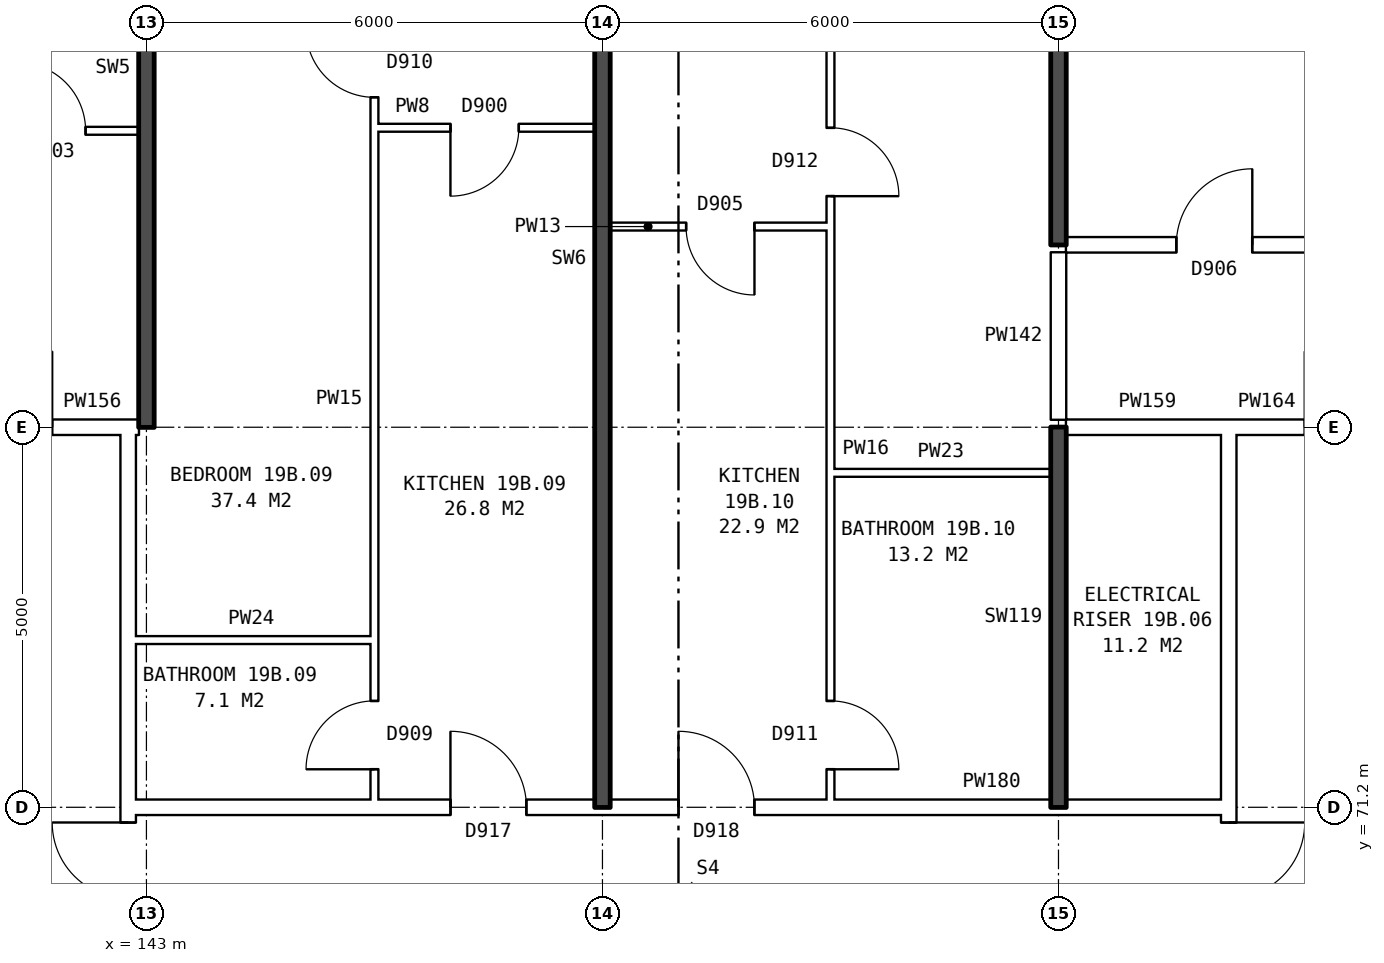
"""IFC4 building model, lengths in metres.
Left out: names, types, materials, properties, quantities, classifications, styles, units other than length and angle.
Written with IfcOpenShell. Run it as: python <this file> out.ifc"""

import sys

from ifc_helpers import new_model, si_unit, direction, frame, frame_2d, origin, place, context, subcontext, project, spatial, rectangle, extrude, element, fill, save


model = new_model("IFC4")
c1 = context("Model", 3, precision=1e-05, world=origin(), true_north=direction((0.0, 1.0)))
c2 = subcontext(c1, "Body", "Model", "MODEL_VIEW")
j1 = project(units=[si_unit("LENGTHUNIT", "METRE"), si_unit("PLANEANGLEUNIT", "RADIAN")], contexts=[c1])
p1 = place(None, origin())
s1 = spatial("IfcSite", under=j1, at=p1, CompositionType="ELEMENT")
p2 = place(p1, origin())
s2 = spatial("IfcBuilding", under=s1, at=p2, CompositionType="ELEMENT")
p3 = place(p2, frame((0.0, 0.0, 71.6)))
s3 = spatial("IfcBuildingStorey", under=s2, at=p3, CompositionType="ELEMENT", Elevation=71.6)
p4 = place(p3, frame((142.76, 63.9, 0.0), z_axis=(0.0, 0.0, 1.0), x_axis=(0.0, 1.0, 0.0)))
e1 = element("IfcWall", 1, at=p4, inside=s3, PredefinedType="PARTITIONING", context=c2, shape_type="SweptSolid", body=[
    extrude(rectangle(XDim=12.2, YDim=0.2, at=frame_2d((6.1, 0.0))), origin(), (0.0, 0.0, 1.0), 2.85),
])
p5 = place(p4, frame((5.1, 0.0, 0.0)))
e2 = element("IfcOpeningElement", 2, at=p5, cuts=e1, PredefinedType="OPENING", context=c2, shape_type="SweptSolid", body=[
    extrude(rectangle(XDim=2.0, YDim=2.1, at=frame_2d((1.0, 1.05))), frame((0.0, 0.11, 0.0), z_axis=(0.0, -1.0, 0.0), x_axis=(1.0, 0.0, 0.0)), (0.0, 0.0, 1.0), 0.22),
])
p6 = place(p3, frame((157.24, 63.9, 0.0), z_axis=(0.0, 0.0, 1.0), x_axis=(0.0, 1.0, 0.0)))
e3 = element("IfcWall", 3, at=p6, inside=s3, PredefinedType="PARTITIONING", context=c2, shape_type="SweptSolid", body=[
    extrude(rectangle(XDim=12.2, YDim=0.2, at=frame_2d((6.1, 0.0))), origin(), (0.0, 0.0, 1.0), 2.85),
])
p7 = place(p6, frame((5.1, 0.0, 0.0)))
e4 = element("IfcOpeningElement", 4, at=p7, cuts=e3, PredefinedType="OPENING", context=c2, shape_type="SweptSolid", body=[
    extrude(rectangle(XDim=2.0, YDim=2.1, at=frame_2d((1.0, 1.05))), frame((0.0, 0.11, 0.0), z_axis=(0.0, -1.0, 0.0), x_axis=(1.0, 0.0, 0.0)), (0.0, 0.0, 1.0), 0.22),
])
p8 = place(p3, frame((142.76, 71.2, 0.0), z_axis=(0.0, 0.0, 1.0), x_axis=(1.0, 0.0, 0.0)))
e5 = element("IfcWall", 5, at=p8, inside=s3, PredefinedType="PARTITIONING", context=c2, shape_type="SweptSolid", body=[
    extrude(rectangle(XDim=14.48, YDim=0.2, at=frame_2d((7.24, 0.0))), origin(), (0.0, 0.0, 1.0), 2.85),
])
p9 = place(p8, frame((4.24, 0.0, 0.0)))
e6 = element("IfcOpeningElement", 6, at=p9, cuts=e5, PredefinedType="OPENING", context=c2, shape_type="SweptSolid", body=[
    extrude(rectangle(XDim=1.0, YDim=2.1, at=frame_2d((0.5, 1.05))), frame((0.0, 0.11, 0.0), z_axis=(0.0, -1.0, 0.0), x_axis=(1.0, 0.0, 0.0)), (0.0, 0.0, 1.0), 0.22),
])
p10 = place(p8, frame((7.24, 0.0, 0.0)))
e7 = element("IfcOpeningElement", 7, at=p10, cuts=e5, PredefinedType="OPENING", context=c2, shape_type="SweptSolid", body=[
    extrude(rectangle(XDim=1.0, YDim=2.1, at=frame_2d((0.5, 1.05))), frame((0.0, 0.11, 0.0), z_axis=(0.0, -1.0, 0.0), x_axis=(1.0, 0.0, 0.0)), (0.0, 0.0, 1.0), 0.22),
])
p11 = place(p3, frame((142.76, 73.4, 0.0), z_axis=(0.0, 0.0, 1.0), x_axis=(1.0, 0.0, 0.0)))
e8 = element("IfcWall", 8, at=p11, inside=s3, PredefinedType="PARTITIONING", context=c2, shape_type="SweptSolid", body=[
    extrude(rectangle(XDim=3.24, YDim=0.1, at=frame_2d((1.62, 0.0))), origin(), (0.0, 0.0, 1.0), 2.85),
])
p12 = place(p3, frame((152.0, 75.6, 0.0), z_axis=(0.0, 0.0, 1.0), x_axis=(1.0, 0.0, 0.0)))
e9 = element("IfcWall", 9, at=p12, inside=s3, PredefinedType="PARTITIONING", context=c2, shape_type="SweptSolid", body=[
    extrude(rectangle(XDim=2.9, YDim=0.1, at=frame_2d((1.45, 0.0))), origin(), (0.0, 0.0, 1.0), 2.85),
])
p13 = place(p3, frame((139.76, 76.2, 0.0), z_axis=(0.0, 0.0, 1.0), x_axis=(1.0, 0.0, 0.0)))
e10 = element("IfcWall", 10, at=p13, inside=s3, PredefinedType="PARTITIONING", context=c2, shape_type="SweptSolid", body=[
    extrude(rectangle(XDim=3.0, YDim=0.2, at=frame_2d((1.5, 0.0))), origin(), (0.0, 0.0, 1.0), 2.85),
])
p14 = place(p13, frame((1.0, 0.0, 0.0)))
e11 = element("IfcOpeningElement", 11, at=p14, cuts=e10, PredefinedType="OPENING", context=c2, shape_type="SweptSolid", body=[
    extrude(rectangle(XDim=1.0, YDim=2.1, at=frame_2d((0.5, 1.05))), frame((0.0, 0.11, 0.0), z_axis=(0.0, -1.0, 0.0), x_axis=(1.0, 0.0, 0.0)), (0.0, 0.0, 1.0), 0.22),
])
p15 = place(p3, frame((142.76, 76.2, 0.0), z_axis=(0.0, 0.0, 1.0), x_axis=(1.0, 0.0, 0.0)))
e12 = element("IfcWall", 12, at=p15, inside=s3, PredefinedType="PARTITIONING", context=c2, shape_type="SweptSolid", body=[
    extrude(rectangle(XDim=0.14, YDim=0.2, at=frame_2d((0.07, 0.0))), origin(), (0.0, 0.0, 1.0), 2.85),
])
p16 = place(p3, frame((155.1, 76.2, 0.0), z_axis=(0.0, 0.0, 1.0), x_axis=(1.0, 0.0, 0.0)))
e13 = element("IfcWall", 13, at=p16, inside=s3, PredefinedType="PARTITIONING", context=c2, shape_type="SweptSolid", body=[
    extrude(rectangle(XDim=2.14, YDim=0.2, at=frame_2d((1.07, 0.0))), origin(), (0.0, 0.0, 1.0), 2.85),
])
p17 = place(p3, frame((157.24, 76.2, 0.0), z_axis=(0.0, 0.0, 1.0), x_axis=(1.0, 0.0, 0.0)))
e14 = element("IfcWall", 14, at=p17, inside=s3, PredefinedType="PARTITIONING", context=c2, shape_type="SweptSolid", body=[
    extrude(rectangle(XDim=3.0, YDim=0.2, at=frame_2d((1.5, 0.0))), origin(), (0.0, 0.0, 1.0), 2.85),
])
p18 = place(p17, frame((1.0, 0.0, 0.0)))
e15 = element("IfcOpeningElement", 15, at=p18, cuts=e14, PredefinedType="OPENING", context=c2, shape_type="SweptSolid", body=[
    extrude(rectangle(XDim=1.0, YDim=2.1, at=frame_2d((0.5, 1.05))), frame((0.0, 0.11, 0.0), z_axis=(0.0, -1.0, 0.0), x_axis=(1.0, 0.0, 0.0)), (0.0, 0.0, 1.0), 0.22),
])
p19 = place(p3, frame((155.1, 78.6, 0.0), z_axis=(0.0, 0.0, 1.0), x_axis=(1.0, 0.0, 0.0)))
e16 = element("IfcWall", 16, at=p19, inside=s3, PredefinedType="PARTITIONING", context=c2, shape_type="SweptSolid", body=[
    extrude(rectangle(XDim=19.79, YDim=0.2, at=frame_2d((9.895, 0.0))), origin(), (0.0, 0.0, 1.0), 2.85),
])
p20 = place(p19, frame((1.45, 0.0, 0.0)))
e17 = element("IfcOpeningElement", 17, at=p20, cuts=e16, PredefinedType="OPENING", context=c2, shape_type="SweptSolid", body=[
    extrude(rectangle(XDim=1.0, YDim=2.1, at=frame_2d((0.5, 1.05))), frame((0.0, 0.11, 0.0), z_axis=(0.0, -1.0, 0.0), x_axis=(1.0, 0.0, 0.0)), (0.0, 0.0, 1.0), 0.22),
])
p21 = place(p19, frame((9.6, 0.0, 0.0)))
e18 = element("IfcOpeningElement", 18, at=p21, cuts=e16, PredefinedType="OPENING", context=c2, shape_type="SweptSolid", body=[
    extrude(rectangle(XDim=1.0, YDim=2.1, at=frame_2d((0.5, 1.05))), frame((0.0, 0.11, 0.0), z_axis=(0.0, -1.0, 0.0), x_axis=(1.0, 0.0, 0.0)), (0.0, 0.0, 1.0), 0.22),
])
p22 = place(p19, frame((13.2, 0.0, 0.0)))
e19 = element("IfcOpeningElement", 19, at=p22, cuts=e16, PredefinedType="OPENING", context=c2, shape_type="SweptSolid", body=[
    extrude(rectangle(XDim=1.0, YDim=2.1, at=frame_2d((0.5, 1.05))), frame((0.0, 0.11, 0.0), z_axis=(0.0, -1.0, 0.0), x_axis=(1.0, 0.0, 0.0)), (0.0, 0.0, 1.0), 0.22),
])
p23 = place(p3, frame((149.1, 78.84, 0.0), z_axis=(0.0, 0.0, 1.0), x_axis=(1.0, 0.0, 0.0)))
e20 = element("IfcWall", 20, at=p23, inside=s3, PredefinedType="PARTITIONING", context=c2, shape_type="SweptSolid", body=[
    extrude(rectangle(XDim=2.9, YDim=0.1, at=frame_2d((1.45, 0.0))), origin(), (0.0, 0.0, 1.0), 2.85),
])
p24 = place(p23, frame((1.0, 0.0, 0.0)))
e21 = element("IfcOpeningElement", 21, at=p24, cuts=e20, PredefinedType="OPENING", context=c2, shape_type="SweptSolid", body=[
    extrude(rectangle(XDim=0.9, YDim=2.1, at=frame_2d((0.45, 1.05))), frame((0.0, 0.06, 0.0), z_axis=(0.0, -1.0, 0.0), x_axis=(1.0, 0.0, 0.0)), (0.0, 0.0, 1.0), 0.12),
])
p25 = place(p3, frame((137.1, 80.1, 0.0), z_axis=(0.0, 0.0, 1.0), x_axis=(1.0, 0.0, 0.0)))
e22 = element("IfcWall", 22, at=p25, inside=s3, PredefinedType="PARTITIONING", context=c2, shape_type="SweptSolid", body=[
    extrude(rectangle(XDim=5.8, YDim=0.1, at=frame_2d((2.9, 0.0))), origin(), (0.0, 0.0, 1.0), 2.85),
])
p26 = place(p25, frame((1.3, 0.0, 0.0)))
e23 = element("IfcOpeningElement", 23, at=p26, cuts=e22, PredefinedType="OPENING", context=c2, shape_type="SweptSolid", body=[
    extrude(rectangle(XDim=0.9, YDim=2.1, at=frame_2d((0.45, 1.05))), frame((0.0, 0.06, 0.0), z_axis=(0.0, -1.0, 0.0), x_axis=(1.0, 0.0, 0.0)), (0.0, 0.0, 1.0), 0.12),
])
p27 = place(p25, frame((4.2, 0.0, 0.0)))
e24 = element("IfcOpeningElement", 24, at=p27, cuts=e22, PredefinedType="OPENING", context=c2, shape_type="SweptSolid", body=[
    extrude(rectangle(XDim=0.9, YDim=2.1, at=frame_2d((0.45, 1.05))), frame((0.0, 0.06, 0.0), z_axis=(0.0, -1.0, 0.0), x_axis=(1.0, 0.0, 0.0)), (0.0, 0.0, 1.0), 0.12),
])
p28 = place(p3, frame((146.0, 80.14, 0.0), z_axis=(0.0, 0.0, 1.0), x_axis=(1.0, 0.0, 0.0)))
e25 = element("IfcWall", 25, at=p28, inside=s3, PredefinedType="PARTITIONING", context=c2, shape_type="SweptSolid", body=[
    extrude(rectangle(XDim=2.9, YDim=0.1, at=frame_2d((1.45, 0.0))), origin(), (0.0, 0.0, 1.0), 2.85),
])
p29 = place(p28, frame((1.0, 0.0, 0.0)))
e26 = element("IfcOpeningElement", 26, at=p29, cuts=e25, PredefinedType="OPENING", context=c2, shape_type="SweptSolid", body=[
    extrude(rectangle(XDim=0.9, YDim=2.1, at=frame_2d((0.45, 1.05))), frame((0.0, 0.06, 0.0), z_axis=(0.0, -1.0, 0.0), x_axis=(1.0, 0.0, 0.0)), (0.0, 0.0, 1.0), 0.12),
])
p30 = place(p3, frame((143.0, 76.2, 0.0), z_axis=(0.0, 0.0, 1.0), x_axis=(0.0, 1.0, 0.0)))
e27 = element("IfcWall", 27, at=p30, inside=s3, PredefinedType="SOLIDWALL", context=c2, shape_type="SweptSolid", body=[
    extrude(rectangle(XDim=9.44, YDim=0.2, at=frame_2d((4.72, 0.0))), origin(), (0.0, 0.0, 1.0), 2.85),
])
p31 = place(p3, frame((146.0, 71.3, 0.0), z_axis=(0.0, 0.0, 1.0), x_axis=(0.0, 1.0, 0.0)))
e28 = element("IfcWall", 28, at=p31, inside=s3, PredefinedType="PARTITIONING", context=c2, shape_type="SweptSolid", body=[
    extrude(rectangle(XDim=14.34, YDim=0.1, at=frame_2d((7.17, 0.0))), origin(), (0.0, 0.0, 1.0), 2.85),
])
p32 = place(p31, frame((9.24, 0.0, 0.0)))
e29 = element("IfcOpeningElement", 29, at=p32, cuts=e28, PredefinedType="OPENING", context=c2, shape_type="SweptSolid", body=[
    extrude(rectangle(XDim=0.9, YDim=2.1, at=frame_2d((0.45, 1.05))), frame((0.0, 0.06, 0.0), z_axis=(0.0, -1.0, 0.0), x_axis=(1.0, 0.0, 0.0)), (0.0, 0.0, 1.0), 0.12),
])
p33 = place(p31, frame((0.4, 0.0, 0.0)))
e30 = element("IfcOpeningElement", 30, at=p33, cuts=e28, PredefinedType="OPENING", context=c2, shape_type="SweptSolid", body=[
    extrude(rectangle(XDim=0.9, YDim=2.1, at=frame_2d((0.45, 1.05))), frame((0.0, 0.06, 0.0), z_axis=(0.0, -1.0, 0.0), x_axis=(1.0, 0.0, 0.0)), (0.0, 0.0, 1.0), 0.12),
])
p34 = place(p3, frame((149.0, 71.2, 0.0), z_axis=(0.0, 0.0, 1.0), x_axis=(0.0, 1.0, 0.0)))
e31 = element("IfcWall", 31, at=p34, inside=s3, PredefinedType="SOLIDWALL", context=c2, shape_type="SweptSolid", body=[
    extrude(rectangle(XDim=14.44, YDim=0.2, at=frame_2d((7.22, 0.0))), origin(), (0.0, 0.0, 1.0), 2.85),
])
p35 = place(p3, frame((152.0, 71.3, 0.0), z_axis=(0.0, 0.0, 1.0), x_axis=(0.0, 1.0, 0.0)))
e32 = element("IfcWall", 32, at=p35, inside=s3, PredefinedType="PARTITIONING", context=c2, shape_type="SweptSolid", body=[
    extrude(rectangle(XDim=14.34, YDim=0.1, at=frame_2d((7.17, 0.0))), origin(), (0.0, 0.0, 1.0), 2.85),
])
p36 = place(p35, frame((7.94, 0.0, 0.0)))
e33 = element("IfcOpeningElement", 33, at=p36, cuts=e32, PredefinedType="OPENING", context=c2, shape_type="SweptSolid", body=[
    extrude(rectangle(XDim=0.9, YDim=2.1, at=frame_2d((0.45, 1.05))), frame((0.0, 0.06, 0.0), z_axis=(0.0, -1.0, 0.0), x_axis=(1.0, 0.0, 0.0)), (0.0, 0.0, 1.0), 0.12),
])
p37 = place(p35, frame((0.4, 0.0, 0.0)))
e34 = element("IfcOpeningElement", 34, at=p37, cuts=e32, PredefinedType="OPENING", context=c2, shape_type="SweptSolid", body=[
    extrude(rectangle(XDim=0.9, YDim=2.1, at=frame_2d((0.45, 1.05))), frame((0.0, 0.06, 0.0), z_axis=(0.0, -1.0, 0.0), x_axis=(1.0, 0.0, 0.0)), (0.0, 0.0, 1.0), 0.12),
])
p38 = place(p3, frame((155.0, 71.2, 0.0), z_axis=(0.0, 0.0, 1.0), x_axis=(0.0, 1.0, 0.0)))
e35 = element("IfcWall", 35, at=p38, inside=s3, PredefinedType="SOLIDWALL", context=c2, shape_type="SweptSolid", body=[
    extrude(rectangle(XDim=5.0, YDim=0.2, at=frame_2d((2.5, 0.0))), origin(), (0.0, 0.0, 1.0), 2.85),
])
p39 = place(p3, frame((155.0, 76.3, 0.0), z_axis=(0.0, 0.0, 1.0), x_axis=(0.0, 1.0, 0.0)))
e36 = element("IfcWall", 36, at=p39, inside=s3, PredefinedType="PARTITIONING", context=c2, shape_type="SweptSolid", body=[
    extrude(rectangle(XDim=2.2, YDim=0.2, at=frame_2d((1.1, 0.0))), origin(), (0.0, 0.0, 1.0), 2.85),
])
p40 = place(p3, frame((155.0, 78.6, 0.0), z_axis=(0.0, 0.0, 1.0), x_axis=(0.0, 1.0, 0.0)))
e37 = element("IfcWall", 37, at=p40, inside=s3, PredefinedType="SOLIDWALL", context=c2, shape_type="SweptSolid", body=[
    extrude(rectangle(XDim=7.04, YDim=0.2, at=frame_2d((3.52, 0.0))), origin(), (0.0, 0.0, 1.0), 2.85),
])
p41 = place(p5, origin())
e38 = element("IfcDoor", 38, at=p41, inside=s3, OperationType="DOUBLE_DOOR_SINGLE_SWING", PredefinedType="DOOR", context=c2, shape_type="SweptSolid", body=[
    extrude(rectangle(XDim=2.0, YDim=2.1, at=frame_2d((1.0, 1.05))), frame((0.0, 0.025, 0.0), z_axis=(0.0, -1.0, 0.0), x_axis=(1.0, 0.0, 0.0)), (0.0, 0.0, 1.0), 0.05),
])
fill(e2, e38)
p42 = place(p7, frame((2.0, 0.0, 0.0), z_axis=(0.0, 0.0, 1.0), x_axis=(-1.0, 0.0, 0.0)))
e39 = element("IfcDoor", 39, at=p42, inside=s3, OperationType="DOUBLE_DOOR_SINGLE_SWING", PredefinedType="DOOR", context=c2, shape_type="SweptSolid", body=[
    extrude(rectangle(XDim=2.0, YDim=2.1, at=frame_2d((1.0, 1.05))), frame((0.0, 0.025, 0.0), z_axis=(0.0, -1.0, 0.0), x_axis=(1.0, 0.0, 0.0)), (0.0, 0.0, 1.0), 0.05),
])
fill(e4, e39)
p43 = place(p27, origin())
e40 = element("IfcDoor", 40, at=p43, inside=s3, OperationType="SINGLE_SWING_LEFT", PredefinedType="DOOR", context=c2, shape_type="SweptSolid", body=[
    extrude(rectangle(XDim=0.9, YDim=2.1, at=frame_2d((0.45, 1.05))), frame((0.0, 0.025, 0.0), z_axis=(0.0, -1.0, 0.0), x_axis=(1.0, 0.0, 0.0)), (0.0, 0.0, 1.0), 0.05),
])
fill(e24, e40)
p44 = place(p32, origin())
e41 = element("IfcDoor", 41, at=p44, inside=s3, OperationType="SINGLE_SWING_RIGHT", PredefinedType="DOOR", context=c2, shape_type="SweptSolid", body=[
    extrude(rectangle(XDim=0.9, YDim=2.1, at=frame_2d((0.45, 1.05))), frame((0.0, 0.025, 0.0), z_axis=(0.0, -1.0, 0.0), x_axis=(1.0, 0.0, 0.0)), (0.0, 0.0, 1.0), 0.05),
])
fill(e29, e41)
p45 = place(p9, origin())
e42 = element("IfcDoor", 42, at=p45, inside=s3, OperationType="SINGLE_SWING_LEFT", PredefinedType="DOOR", context=c2, shape_type="SweptSolid", body=[
    extrude(rectangle(XDim=1.0, YDim=2.1, at=frame_2d((0.5, 1.05))), frame((0.0, 0.025, 0.0), z_axis=(0.0, -1.0, 0.0), x_axis=(1.0, 0.0, 0.0)), (0.0, 0.0, 1.0), 0.05),
])
fill(e6, e42)
p46 = place(p29, frame((0.9, 0.0, 0.0), z_axis=(0.0, 0.0, 1.0), x_axis=(-1.0, 0.0, 0.0)))
e43 = element("IfcDoor", 43, at=p46, inside=s3, OperationType="SINGLE_SWING_RIGHT", PredefinedType="DOOR", context=c2, shape_type="SweptSolid", body=[
    extrude(rectangle(XDim=0.9, YDim=2.1, at=frame_2d((0.45, 1.05))), frame((0.0, 0.025, 0.0), z_axis=(0.0, -1.0, 0.0), x_axis=(1.0, 0.0, 0.0)), (0.0, 0.0, 1.0), 0.05),
])
fill(e26, e43)
p47 = place(p33, origin())
e44 = element("IfcDoor", 44, at=p47, inside=s3, OperationType="SINGLE_SWING_LEFT", PredefinedType="DOOR", context=c2, shape_type="SweptSolid", body=[
    extrude(rectangle(XDim=0.9, YDim=2.1, at=frame_2d((0.45, 1.05))), frame((0.0, 0.025, 0.0), z_axis=(0.0, -1.0, 0.0), x_axis=(1.0, 0.0, 0.0)), (0.0, 0.0, 1.0), 0.05),
])
fill(e30, e44)
p48 = place(p36, frame((0.9, 0.0, 0.0), z_axis=(0.0, 0.0, 1.0), x_axis=(-1.0, 0.0, 0.0)))
e45 = element("IfcDoor", 45, at=p48, inside=s3, OperationType="SINGLE_SWING_RIGHT", PredefinedType="DOOR", context=c2, shape_type="SweptSolid", body=[
    extrude(rectangle(XDim=0.9, YDim=2.1, at=frame_2d((0.45, 1.05))), frame((0.0, 0.025, 0.0), z_axis=(0.0, -1.0, 0.0), x_axis=(1.0, 0.0, 0.0)), (0.0, 0.0, 1.0), 0.05),
])
fill(e33, e45)
p49 = place(p10, origin())
e46 = element("IfcDoor", 46, at=p49, inside=s3, OperationType="SINGLE_SWING_LEFT", PredefinedType="DOOR", context=c2, shape_type="SweptSolid", body=[
    extrude(rectangle(XDim=1.0, YDim=2.1, at=frame_2d((0.5, 1.05))), frame((0.0, 0.025, 0.0), z_axis=(0.0, -1.0, 0.0), x_axis=(1.0, 0.0, 0.0)), (0.0, 0.0, 1.0), 0.05),
])
fill(e7, e46)
p50 = place(p24, frame((0.9, 0.0, 0.0), z_axis=(0.0, 0.0, 1.0), x_axis=(-1.0, 0.0, 0.0)))
e47 = element("IfcDoor", 47, at=p50, inside=s3, OperationType="SINGLE_SWING_LEFT", PredefinedType="DOOR", context=c2, shape_type="SweptSolid", body=[
    extrude(rectangle(XDim=0.9, YDim=2.1, at=frame_2d((0.45, 1.05))), frame((0.0, 0.025, 0.0), z_axis=(0.0, -1.0, 0.0), x_axis=(1.0, 0.0, 0.0)), (0.0, 0.0, 1.0), 0.05),
])
fill(e21, e47)
p51 = place(p37, frame((0.9, 0.0, 0.0), z_axis=(0.0, 0.0, 1.0), x_axis=(-1.0, 0.0, 0.0)))
e48 = element("IfcDoor", 48, at=p51, inside=s3, OperationType="SINGLE_SWING_RIGHT", PredefinedType="DOOR", context=c2, shape_type="SweptSolid", body=[
    extrude(rectangle(XDim=0.9, YDim=2.1, at=frame_2d((0.45, 1.05))), frame((0.0, 0.025, 0.0), z_axis=(0.0, -1.0, 0.0), x_axis=(1.0, 0.0, 0.0)), (0.0, 0.0, 1.0), 0.05),
])
fill(e34, e48)
p52 = place(p20, origin())
e49 = element("IfcDoor", 49, at=p52, inside=s3, OperationType="SINGLE_SWING_RIGHT", PredefinedType="DOOR", context=c2, shape_type="SweptSolid", body=[
    extrude(rectangle(XDim=1.0, YDim=2.1, at=frame_2d((0.5, 1.05))), frame((0.0, 0.025, 0.0), z_axis=(0.0, -1.0, 0.0), x_axis=(1.0, 0.0, 0.0)), (0.0, 0.0, 1.0), 0.05),
])
fill(e17, e49)
save(model, sys.argv[1])
